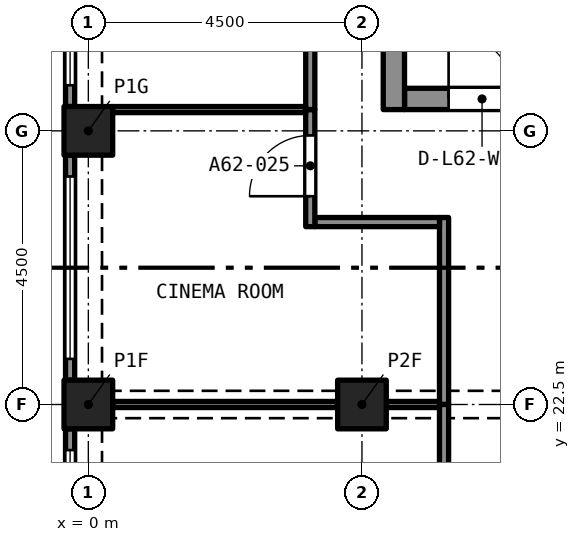
"""IFC4 building model, lengths in metres.
Left out: names, types, materials, properties, quantities, classifications, styles, units other than length and angle.
Written with IfcOpenShell. Run it as: python <this file> out.ifc"""

import sys

from ifc_helpers import new_model, si_unit, direction, frame, frame_2d, origin, origin_2d, place, context, subcontext, project, spatial, rectangle, extrude, element, fill, save


model = new_model("IFC4")
c1 = context("Model", 3, precision=1e-05, world=origin(), true_north=direction((0.0, 1.0)))
c2 = subcontext(c1, "Body", "Model", "MODEL_VIEW")
j1 = project(units=[si_unit("LENGTHUNIT", "METRE"), si_unit("PLANEANGLEUNIT", "RADIAN")], contexts=[c1])
p1 = place(None, origin())
s1 = spatial("IfcSite", under=j1, at=p1, CompositionType="ELEMENT")
p2 = place(p1, origin())
s2 = spatial("IfcBuilding", under=s1, at=p2, CompositionType="ELEMENT")
p3 = place(p2, frame((0.0, 0.0, 222.895)))
s3 = spatial("IfcBuildingStorey", under=s2, at=p3, CompositionType="ELEMENT", Elevation=222.895)
for number, where, z_axis, x_axis in (
    (1, (0.0, 22.5, 0.0), (0.0, 0.0, 1.0), (1.0, 0.0, 0.0)),
    (2, (4.5, 22.5, 0.0), (0.0, 0.0, 1.0), (1.0, 0.0, 0.0)),
    (3, (0.0, 27.0, 0.0), (0.0, 0.0, 1.0), (1.0, 0.0, 0.0)),
):
    element("IfcColumn", number, at=place(p3, frame(where, z_axis=z_axis, x_axis=x_axis)), inside=s3, PredefinedType="COLUMN", context=c2, shape_type="SweptSolid", body=[
        extrude(rectangle(XDim=0.8, YDim=0.8, at=origin_2d()), origin(), (0.0, 0.0, 1.0), 3.2),
    ])
p4 = place(p3, frame((5.2, 27.525, 0.0), z_axis=(0.0, 0.0, 1.0), x_axis=(1.0, 0.0, 0.0)))
e4 = element("IfcWall", 4, at=p4, inside=s3, PredefinedType="SOLIDWALL", context=c2, shape_type="SweptSolid", body=[
    extrude(rectangle(XDim=7.6, YDim=0.35, at=frame_2d((3.8, 0.0))), origin(), (0.0, 0.0, 1.0), 3.2),
])
p5 = place(p4, frame((0.725, 0.0, 0.0)))
e5 = element("IfcOpeningElement", 5, at=p5, cuts=e4, PredefinedType="OPENING", context=c2, shape_type="SweptSolid", body=[
    extrude(rectangle(XDim=1.1, YDim=2.1, at=frame_2d((0.55, 1.05))), frame((0.0, 0.185, 0.0), z_axis=(0.0, -1.0, 0.0), x_axis=(1.0, 0.0, 0.0)), (0.0, 0.0, 1.0), 0.37),
])
p6 = place(p4, frame((3.25, 0.0, 0.0)))
e6 = element("IfcOpeningElement", 6, at=p6, cuts=e4, PredefinedType="OPENING", context=c2, shape_type="SweptSolid", body=[
    extrude(rectangle(XDim=1.1, YDim=2.1, at=frame_2d((0.55, 1.05))), frame((0.0, 0.185, 0.0), z_axis=(0.0, -1.0, 0.0), x_axis=(1.0, 0.0, 0.0)), (0.0, 0.0, 1.0), 0.37),
])
p7 = place(p4, frame((5.775, 0.0, 0.0)))
e7 = element("IfcOpeningElement", 7, at=p7, cuts=e4, PredefinedType="OPENING", context=c2, shape_type="SweptSolid", body=[
    extrude(rectangle(XDim=1.1, YDim=2.1, at=frame_2d((0.55, 1.05))), frame((0.0, 0.185, 0.0), z_axis=(0.0, -1.0, 0.0), x_axis=(1.0, 0.0, 0.0)), (0.0, 0.0, 1.0), 0.37),
])
p8 = place(p3, frame((5.025, 27.35, 0.0), z_axis=(0.0, 0.0, 1.0), x_axis=(0.0, 1.0, 0.0)))
e8 = element("IfcWall", 8, at=p8, inside=s3, PredefinedType="SOLIDWALL", context=c2, shape_type="SweptSolid", body=[
    extrude(rectangle(XDim=12.8, YDim=0.35, at=frame_2d((6.4, 0.0))), origin(), (0.0, 0.0, 1.0), 3.2),
])
p9 = place(p8, frame((8.6, 0.0, 0.0)))
e9 = element("IfcOpeningElement", 9, at=p9, cuts=e8, PredefinedType="OPENING", context=c2, shape_type="SweptSolid", body=[
    extrude(rectangle(XDim=1.2, YDim=2.1, at=frame_2d((0.6, 1.05))), frame((0.0, 0.185, 0.0), z_axis=(0.0, -1.0, 0.0), x_axis=(1.0, 0.0, 0.0)), (0.0, 0.0, 1.0), 0.37),
])
p10 = place(p3, frame((-0.3, 27.4, 0.0), z_axis=(0.0, 0.0, 1.0), x_axis=(0.0, 1.0, 0.0)))
e10 = element("IfcWall", 10, at=p10, inside=s3, PredefinedType="SOLIDWALL", context=c2, shape_type="SweptSolid", body=[
    extrude(rectangle(XDim=3.7, YDim=0.15, at=frame_2d((1.85, 0.0))), origin(), (0.0, 0.0, 1.0), 3.2),
])
p11 = place(p10, frame((0.35, 0.0, 0.45)))
e11 = element("IfcOpeningElement", 11, at=p11, cuts=e10, PredefinedType="OPENING", context=c2, shape_type="SweptSolid", body=[
    extrude(rectangle(XDim=3.0, YDim=1.95, at=frame_2d((1.5, 0.975))), frame((0.0, 0.085, 0.0), z_axis=(0.0, -1.0, 0.0), x_axis=(1.0, 0.0, 0.0)), (0.0, 0.0, 1.0), 0.17),
])
p12 = place(p3, frame((-0.3, 22.9, 0.0), z_axis=(0.0, 0.0, 1.0), x_axis=(0.0, 1.0, 0.0)))
e12 = element("IfcWall", 12, at=p12, inside=s3, PredefinedType="SOLIDWALL", context=c2, shape_type="SweptSolid", body=[
    extrude(rectangle(XDim=3.7, YDim=0.15, at=frame_2d((1.85, 0.0))), origin(), (0.0, 0.0, 1.0), 3.2),
])
p13 = place(p12, frame((0.35, 0.0, 0.45)))
e13 = element("IfcOpeningElement", 13, at=p13, cuts=e12, PredefinedType="OPENING", context=c2, shape_type="SweptSolid", body=[
    extrude(rectangle(XDim=3.0, YDim=1.95, at=frame_2d((1.5, 0.975))), frame((0.0, 0.085, 0.0), z_axis=(0.0, -1.0, 0.0), x_axis=(1.0, 0.0, 0.0)), (0.0, 0.0, 1.0), 0.17),
])
p14 = place(p3, frame((-0.3, 18.4, 0.0), z_axis=(0.0, 0.0, 1.0), x_axis=(0.0, 1.0, 0.0)))
e14 = element("IfcWall", 14, at=p14, inside=s3, PredefinedType="SOLIDWALL", context=c2, shape_type="SweptSolid", body=[
    extrude(rectangle(XDim=3.7, YDim=0.15, at=frame_2d((1.85, 0.0))), origin(), (0.0, 0.0, 1.0), 3.2),
])
p15 = place(p14, frame((0.35, 0.0, 0.45)))
e15 = element("IfcOpeningElement", 15, at=p15, cuts=e14, PredefinedType="OPENING", context=c2, shape_type="SweptSolid", body=[
    extrude(rectangle(XDim=3.0, YDim=1.95, at=frame_2d((1.5, 0.975))), frame((0.0, 0.085, 0.0), z_axis=(0.0, -1.0, 0.0), x_axis=(1.0, 0.0, 0.0)), (0.0, 0.0, 1.0), 0.17),
])
p16 = place(p3, frame((5.85, 22.5, 0.0), z_axis=(0.0, 0.0, 1.0), x_axis=(0.0, 1.0, 0.0)))
e16 = element("IfcWall", 16, at=p16, inside=s3, PredefinedType="PARTITIONING", context=c2, shape_type="SweptSolid", body=[
    extrude(rectangle(XDim=3.075, YDim=0.15, at=frame_2d((1.538, 0.0))), origin(), (0.0, 0.0, 1.0), 2.9),
])
p17 = place(p3, frame((3.725, 25.5, 0.0), z_axis=(0.0, 0.0, 1.0), x_axis=(1.0, 0.0, 0.0)))
e17 = element("IfcWall", 17, at=p17, inside=s3, PredefinedType="PARTITIONING", context=c2, shape_type="SweptSolid", body=[
    extrude(rectangle(XDim=2.05, YDim=0.15, at=frame_2d((1.025, 0.0))), origin(), (0.0, 0.0, 1.0), 2.9),
])
p18 = place(p3, frame((3.65, 25.425, 0.0), z_axis=(0.0, 0.0, 1.0), x_axis=(0.0, 1.0, 0.0)))
e18 = element("IfcWall", 18, at=p18, inside=s3, PredefinedType="PARTITIONING", context=c2, shape_type="SweptSolid", body=[
    extrude(rectangle(XDim=1.925, YDim=0.15, at=frame_2d((0.962, 0.0))), origin(), (0.0, 0.0, 1.0), 2.9),
])
p19 = place(p18, frame((0.5, 0.0, 0.0)))
e19 = element("IfcOpeningElement", 19, at=p19, cuts=e18, PredefinedType="OPENING", context=c2, shape_type="SweptSolid", body=[
    extrude(rectangle(XDim=1.0, YDim=2.1, at=frame_2d((0.5, 1.05))), frame((0.0, 0.085, 0.0), z_axis=(0.0, -1.0, 0.0), x_axis=(1.0, 0.0, 0.0)), (0.0, 0.0, 1.0), 0.17),
])
p20 = place(p3, frame((3.65, 27.35, 0.0), z_axis=(0.0, 0.0, 1.0), x_axis=(0.0, 1.0, 0.0)))
e20 = element("IfcWall", 20, at=p20, inside=s3, PredefinedType="PARTITIONING", context=c2, shape_type="SweptSolid", body=[
    extrude(rectangle(XDim=4.15, YDim=0.15, at=frame_2d((2.075, 0.0))), origin(), (0.0, 0.0, 1.0), 2.9),
])
p21 = place(p20, frame((1.575, 0.0, 0.0)))
e21 = element("IfcOpeningElement", 21, at=p21, cuts=e20, PredefinedType="OPENING", context=c2, shape_type="SweptSolid", body=[
    extrude(rectangle(XDim=1.0, YDim=2.1, at=frame_2d((0.5, 1.05))), frame((0.0, 0.085, 0.0), z_axis=(0.0, -1.0, 0.0), x_axis=(1.0, 0.0, 0.0)), (0.0, 0.0, 1.0), 0.17),
])
p22 = place(p3, frame((5.85, 13.025, 0.0), z_axis=(0.0, 0.0, 1.0), x_axis=(0.0, 1.0, 0.0)))
e22 = element("IfcWall", 22, at=p22, inside=s3, PredefinedType="PARTITIONING", context=c2, shape_type="SweptSolid", body=[
    extrude(rectangle(XDim=9.475, YDim=0.15, at=frame_2d((4.738, 0.0))), origin(), (0.0, 0.0, 1.0), 2.9),
])
p23 = place(p22, frame((4.275, 0.0, 0.0)))
e23 = element("IfcOpeningElement", 23, at=p23, cuts=e22, PredefinedType="OPENING", context=c2, shape_type="SweptSolid", body=[
    extrude(rectangle(XDim=1.0, YDim=2.1, at=frame_2d((0.5, 1.05))), frame((0.0, 0.085, 0.0), z_axis=(0.0, -1.0, 0.0), x_axis=(1.0, 0.0, 0.0)), (0.0, 0.0, 1.0), 0.17),
])
p24 = place(p3, frame((0.4, 27.35, 0.0), z_axis=(0.0, 0.0, 1.0), x_axis=(1.0, 0.0, 0.0)))
e24 = element("IfcWall", 24, at=p24, inside=s3, PredefinedType="PARTITIONING", context=c2, shape_type="SweptSolid", body=[
    extrude(rectangle(XDim=3.175, YDim=0.1, at=frame_2d((1.587, 0.0))), origin(), (0.0, 0.0, 1.0), 2.9),
])
p25 = place(p3, frame((4.9, 22.5, 0.0), z_axis=(0.0, 0.0, 1.0), x_axis=(1.0, 0.0, 0.0)))
e25 = element("IfcWall", 25, at=p25, inside=s3, PredefinedType="PARTITIONING", context=c2, shape_type="SweptSolid", body=[
    extrude(rectangle(XDim=0.875, YDim=0.1, at=frame_2d((0.438, 0.0))), origin(), (0.0, 0.0, 1.0), 2.38),
])
p26 = place(p3, frame((0.4, 22.5, 0.0), z_axis=(0.0, 0.0, 1.0), x_axis=(1.0, 0.0, 0.0)))
e26 = element("IfcWall", 26, at=p26, inside=s3, PredefinedType="PARTITIONING", context=c2, shape_type="SweptSolid", body=[
    extrude(rectangle(XDim=3.7, YDim=0.1, at=frame_2d((1.85, 0.0))), origin(), (0.0, 0.0, 1.0), 2.38),
])
p27 = place(p11, origin())
e27 = element("IfcWindow", 27, at=p27, inside=s3, PartitioningType="SINGLE_PANEL", PredefinedType="WINDOW", context=c2, shape_type="SweptSolid", body=[
    extrude(rectangle(XDim=3.0, YDim=1.95, at=frame_2d((1.5, 0.975))), frame((0.0, 0.03, 0.0), z_axis=(0.0, -1.0, 0.0), x_axis=(1.0, 0.0, 0.0)), (0.0, 0.0, 1.0), 0.06),
])
fill(e11, e27)
p28 = place(p13, origin())
e28 = element("IfcWindow", 28, at=p28, inside=s3, PartitioningType="SINGLE_PANEL", PredefinedType="WINDOW", context=c2, shape_type="SweptSolid", body=[
    extrude(rectangle(XDim=3.0, YDim=1.95, at=frame_2d((1.5, 0.975))), frame((0.0, 0.03, 0.0), z_axis=(0.0, -1.0, 0.0), x_axis=(1.0, 0.0, 0.0)), (0.0, 0.0, 1.0), 0.06),
])
fill(e13, e28)
p29 = place(p15, origin())
e29 = element("IfcWindow", 29, at=p29, inside=s3, PartitioningType="SINGLE_PANEL", PredefinedType="WINDOW", context=c2, shape_type="SweptSolid", body=[
    extrude(rectangle(XDim=3.0, YDim=1.95, at=frame_2d((1.5, 0.975))), frame((0.0, 0.03, 0.0), z_axis=(0.0, -1.0, 0.0), x_axis=(1.0, 0.0, 0.0)), (0.0, 0.0, 1.0), 0.06),
])
fill(e15, e29)
p30 = place(p19, origin())
e30 = element("IfcDoor", 30, at=p30, inside=s3, OperationType="SINGLE_SWING_RIGHT", PredefinedType="DOOR", context=c2, shape_type="SweptSolid", body=[
    extrude(rectangle(XDim=1.0, YDim=2.1, at=frame_2d((0.5, 1.05))), frame((0.0, 0.025, 0.0), z_axis=(0.0, -1.0, 0.0), x_axis=(1.0, 0.0, 0.0)), (0.0, 0.0, 1.0), 0.05),
])
fill(e19, e30)
p31 = place(p5, origin())
e31 = element("IfcDoor", 31, at=p31, inside=s3, OperationType="SINGLE_SWING_LEFT", PredefinedType="DOOR", context=c2, shape_type="SweptSolid", body=[
    extrude(rectangle(XDim=1.1, YDim=2.1, at=frame_2d((0.55, 1.05))), frame((0.0, 0.025, 0.0), z_axis=(0.0, -1.0, 0.0), x_axis=(1.0, 0.0, 0.0)), (0.0, 0.0, 1.0), 0.05),
])
fill(e5, e31)
save(model, sys.argv[1])
